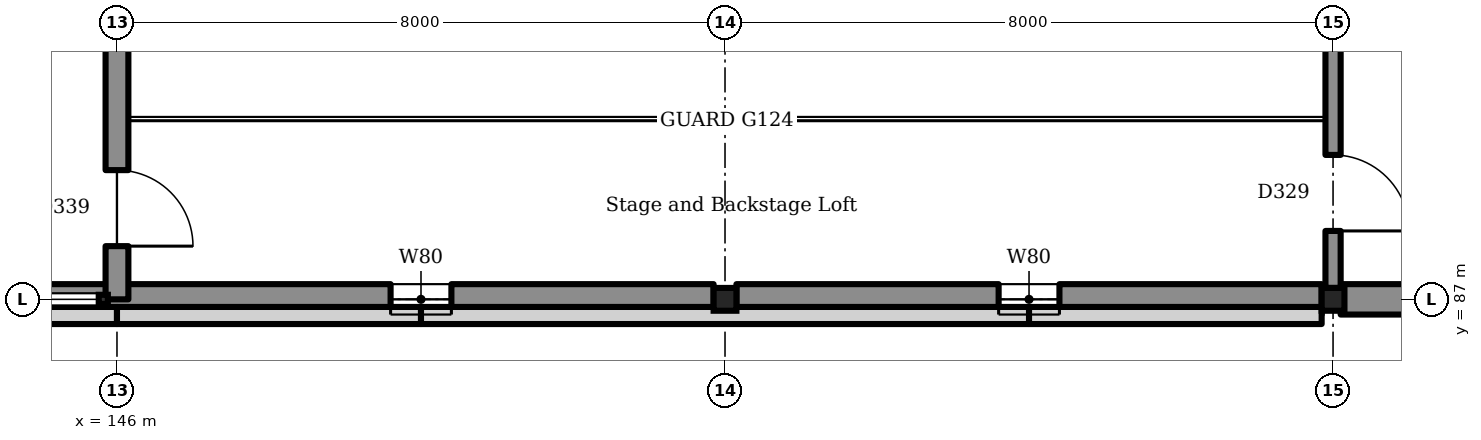
"""IFC4 building model, lengths in metres.
Left out: names, types, materials, properties, quantities, classifications, styles, units other than length and angle.
Written with IfcOpenShell. Run it as: python <this file> out.ifc"""

import sys

from ifc_helpers import new_model, si_unit, direction, frame, frame_2d, origin, origin_2d, place, context, subcontext, project, spatial, rectangle, i_section, extrude, element, fill, save


model = new_model("IFC4")
c1 = context("Model", 3, precision=1e-05, world=origin(), true_north=direction((0.0, 1.0)))
c2 = subcontext(c1, "Body", "Model", "MODEL_VIEW")
j1 = project(units=[si_unit("LENGTHUNIT", "METRE"), si_unit("PLANEANGLEUNIT", "RADIAN")], contexts=[c1])
p1 = place(None, origin())
s1 = spatial("IfcSite", under=j1, at=p1, CompositionType="ELEMENT")
p2 = place(p1, origin())
s2 = spatial("IfcBuilding", under=s1, at=p2, CompositionType="ELEMENT")
p3 = place(p2, frame((0.0, 0.0, 9.9)))
s3 = spatial("IfcBuildingStorey", under=s2, at=p3, CompositionType="ELEMENT", Elevation=9.9)
p4 = place(p3, frame((162.0, 87.0, 0.0), z_axis=(0.0, 0.0, 1.0), x_axis=(1.0, 0.0, 0.0)))
e1 = element("IfcColumn", 1, at=p4, inside=s3, PredefinedType="COLUMN", context=c2, shape_type="SweptSolid", body=[
    extrude(i_section(OverallWidth=0.3, OverallDepth=0.3, WebThickness=0.011, FlangeThickness=0.019, FilletRadius=0.027, at=origin_2d()), origin(), (0.0, 0.0, 1.0), 4.5),
])
p5 = place(p3, frame((154.0, 87.0, 0.0), z_axis=(0.0, 0.0, 1.0), x_axis=(1.0, 0.0, 0.0)))
e2 = element("IfcColumn", 2, at=p5, inside=s3, PredefinedType="COLUMN", context=c2, shape_type="SweptSolid", body=[
    extrude(i_section(OverallWidth=0.3, OverallDepth=0.3, WebThickness=0.011, FlangeThickness=0.019, FilletRadius=0.027, at=origin_2d()), origin(), (0.0, 0.0, 1.0), 2.85),
])
p6 = place(p3, frame((138.09, 87.0, 0.0), z_axis=(0.0, 0.0, 1.0), x_axis=(1.0, 0.0, 0.0)))
e3 = element("IfcWall", 3, at=p6, inside=s3, PredefinedType="SOLIDWALL", context=c2, shape_type="SweptSolid", body=[
    extrude(rectangle(XDim=15.76, YDim=0.4, at=frame_2d((7.88, 0.0))), origin(), (0.0, 0.0, 1.0), 2.85),
])
p7 = place(p6, frame((11.51, 0.0, 0.9)))
e4 = element("IfcOpeningElement", 4, at=p7, cuts=e3, PredefinedType="OPENING", context=c2, shape_type="SweptSolid", body=[
    extrude(rectangle(XDim=0.8, YDim=1.8, at=frame_2d((0.4, 0.9))), frame((0.0, 0.21, 0.0), z_axis=(0.0, -1.0, 0.0), x_axis=(1.0, 0.0, 0.0)), (0.0, 0.0, 1.0), 0.42),
])
p8 = place(p3, frame((154.15, 87.0, 0.0), z_axis=(0.0, 0.0, 1.0), x_axis=(1.0, 0.0, 0.0)))
e5 = element("IfcWall", 5, at=p8, inside=s3, PredefinedType="SOLIDWALL", context=c2, shape_type="SweptSolid", body=[
    extrude(rectangle(XDim=7.7, YDim=0.4, at=frame_2d((3.85, 0.0))), origin(), (0.0, 0.0, 1.0), 2.85),
])
p9 = place(p8, frame((3.45, 0.0, 0.9)))
e6 = element("IfcOpeningElement", 6, at=p9, cuts=e5, PredefinedType="OPENING", context=c2, shape_type="SweptSolid", body=[
    extrude(rectangle(XDim=0.8, YDim=1.8, at=frame_2d((0.4, 0.9))), frame((0.0, 0.21, 0.0), z_axis=(0.0, -1.0, 0.0), x_axis=(1.0, 0.0, 0.0)), (0.0, 0.0, 1.0), 0.42),
])
p10 = place(p3, frame((162.1, 87.0, 0.0), z_axis=(0.0, 0.0, 1.0), x_axis=(1.0, 0.0, 0.0)))
e7 = element("IfcWall", 7, at=p10, inside=s3, PredefinedType="SOLIDWALL", context=c2, shape_type="SweptSolid", body=[
    extrude(rectangle(XDim=7.75, YDim=0.4, at=frame_2d((3.875, 0.0))), origin(), (0.0, 0.0, 1.0), 4.25),
])
p11 = place(p10, frame((1.8, 0.0, 0.9)))
e8 = element("IfcOpeningElement", 8, at=p11, cuts=e7, PredefinedType="OPENING", context=c2, shape_type="SweptSolid", body=[
    extrude(rectangle(XDim=0.8, YDim=1.8, at=frame_2d((0.4, 0.9))), frame((0.0, 0.21, 0.0), z_axis=(0.0, -1.0, 0.0), x_axis=(1.0, 0.0, 0.0)), (0.0, 0.0, 1.0), 0.42),
])
p12 = place(p3, frame((142.0, 86.788, 2.85), z_axis=(0.0, 0.0, 1.0), x_axis=(1.0, 0.0, 0.0)))
e9 = element("IfcWall", 9, at=p12, inside=s3, PredefinedType="SOLIDWALL", context=c2, shape_type="SweptSolid", body=[
    extrude(rectangle(XDim=4.0, YDim=0.225, at=frame_2d((2.0, 0.0))), origin(), (0.0, 0.0, 1.0), 3.65),
])
p13 = place(p3, frame((146.0, 86.788, 2.85), z_axis=(0.0, 0.0, 1.0), x_axis=(1.0, 0.0, 0.0)))
e10 = element("IfcWall", 10, at=p13, inside=s3, PredefinedType="SOLIDWALL", context=c2, shape_type="SweptSolid", body=[
    extrude(rectangle(XDim=4.0, YDim=0.225, at=frame_2d((2.0, 0.0))), origin(), (0.0, 0.0, 1.0), 4.65),
])
p14 = place(p3, frame((150.0, 86.788, 2.85), z_axis=(0.0, 0.0, 1.0), x_axis=(1.0, 0.0, 0.0)))
e11 = element("IfcWall", 11, at=p14, inside=s3, PredefinedType="SOLIDWALL", context=c2, shape_type="SweptSolid", body=[
    extrude(rectangle(XDim=8.0, YDim=0.225, at=frame_2d((4.0, 0.0))), origin(), (0.0, 0.0, 1.0), 5.65),
])
p15 = place(p3, frame((158.0, 86.788, 2.85), z_axis=(0.0, 0.0, 1.0), x_axis=(1.0, 0.0, 0.0)))
e12 = element("IfcWall", 12, at=p15, inside=s3, PredefinedType="SOLIDWALL", context=c2, shape_type="SweptSolid", body=[
    extrude(rectangle(XDim=3.85, YDim=0.225, at=frame_2d((1.925, 0.0))), origin(), (0.0, 0.0, 1.0), 4.65),
])
p16 = place(p3, frame((146.0, 87.0, 0.0), z_axis=(0.0, 0.0, 1.0), x_axis=(0.0, 1.0, 0.0)))
e13 = element("IfcWall", 13, at=p16, inside=s3, PredefinedType="SOLIDWALL", context=c2, shape_type="SweptSolid", body=[
    extrude(rectangle(XDim=8.9, YDim=0.3, at=frame_2d((4.45, 0.0))), origin(), (0.0, 0.0, 1.0), 6.05),
])
p17 = place(p16, frame((0.7, 0.0, 0.0)))
e14 = element("IfcOpeningElement", 14, at=p17, cuts=e13, PredefinedType="OPENING", context=c2, shape_type="SweptSolid", body=[
    extrude(rectangle(XDim=1.0, YDim=2.1, at=frame_2d((0.5, 1.05))), frame((0.0, 0.16, 0.0), z_axis=(0.0, -1.0, 0.0), x_axis=(1.0, 0.0, 0.0)), (0.0, 0.0, 1.0), 0.32),
])
p18 = place(p3, frame((162.0, 87.15, 0.0), z_axis=(0.0, 0.0, 1.0), x_axis=(0.0, 1.0, 0.0)))
e15 = element("IfcWall", 15, at=p18, inside=s3, PredefinedType="SOLIDWALL", context=c2, shape_type="SweptSolid", body=[
    extrude(rectangle(XDim=8.7, YDim=0.2, at=frame_2d((4.35, 0.0))), origin(), (0.0, 0.0, 1.0), 4.25),
])
p19 = place(p18, frame((0.75, 0.0, 0.0)))
e16 = element("IfcOpeningElement", 16, at=p19, cuts=e15, PredefinedType="OPENING", context=c2, shape_type="SweptSolid", body=[
    extrude(rectangle(XDim=1.0, YDim=2.1, at=frame_2d((0.5, 1.05))), frame((0.0, 0.11, 0.0), z_axis=(0.0, -1.0, 0.0), x_axis=(1.0, 0.0, 0.0)), (0.0, 0.0, 1.0), 0.22),
])
p20 = place(p7, origin())
e17 = element("IfcWindow", 17, at=p20, inside=s3, PartitioningType="SINGLE_PANEL", PredefinedType="WINDOW", context=c2, shape_type="SweptSolid", body=[
    extrude(rectangle(XDim=0.8, YDim=1.8, at=frame_2d((0.4, 0.9))), frame((0.0, 0.03, 0.0), z_axis=(0.0, -1.0, 0.0), x_axis=(1.0, 0.0, 0.0)), (0.0, 0.0, 1.0), 0.06),
])
fill(e4, e17)
p21 = place(p9, origin())
e18 = element("IfcWindow", 18, at=p21, inside=s3, PartitioningType="SINGLE_PANEL", PredefinedType="WINDOW", context=c2, shape_type="SweptSolid", body=[
    extrude(rectangle(XDim=0.8, YDim=1.8, at=frame_2d((0.4, 0.9))), frame((0.0, 0.03, 0.0), z_axis=(0.0, -1.0, 0.0), x_axis=(1.0, 0.0, 0.0)), (0.0, 0.0, 1.0), 0.06),
])
fill(e6, e18)
p22 = place(p19, frame((1.0, 0.0, 0.0), z_axis=(0.0, 0.0, 1.0), x_axis=(-1.0, 0.0, 0.0)))
e19 = element("IfcDoor", 19, at=p22, inside=s3, OperationType="SINGLE_SWING_LEFT", PredefinedType="DOOR", context=c2, shape_type="SweptSolid", body=[
    extrude(rectangle(XDim=1.0, YDim=2.1, at=frame_2d((0.5, 1.05))), frame((0.0, 0.025, 0.0), z_axis=(0.0, -1.0, 0.0), x_axis=(1.0, 0.0, 0.0)), (0.0, 0.0, 1.0), 0.05),
])
fill(e16, e19)
p23 = place(p17, frame((1.0, 0.0, 0.0), z_axis=(0.0, 0.0, 1.0), x_axis=(-1.0, 0.0, 0.0)))
e20 = element("IfcDoor", 20, at=p23, inside=s3, OperationType="SINGLE_SWING_LEFT", PredefinedType="DOOR", context=c2, shape_type="SweptSolid", body=[
    extrude(rectangle(XDim=1.0, YDim=2.1, at=frame_2d((0.5, 1.05))), frame((0.0, 0.025, 0.0), z_axis=(0.0, -1.0, 0.0), x_axis=(1.0, 0.0, 0.0)), (0.0, 0.0, 1.0), 0.05),
])
fill(e14, e20)
save(model, sys.argv[1])
